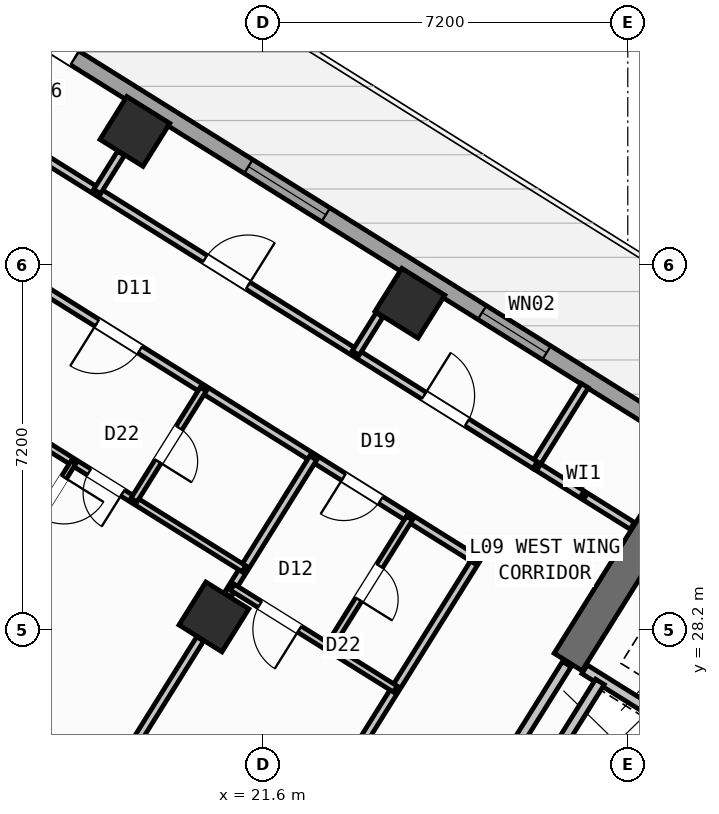
"""IFC4 building model, lengths in metres.
Left out: names, types, materials, properties, quantities, classifications, styles, units other than length and angle.
Written with IfcOpenShell. Run it as: python <this file> out.ifc"""

import sys

from ifc_helpers import new_model, si_unit, direction, frame, frame_2d, origin, origin_2d, place, context, subcontext, project, spatial, rectangle, hollow_rectangle, extrude, source, transform, mapped, element, fill, save


model = new_model("IFC4")
c1 = context("Model", 3, precision=1e-05, world=origin(), true_north=direction((0.0, 1.0)))
c2 = subcontext(c1, "Body", "Model", "MODEL_VIEW")
j1 = project(units=[si_unit("LENGTHUNIT", "METRE"), si_unit("PLANEANGLEUNIT", "RADIAN")], contexts=[c1])
p1 = place(None, origin())
s1 = spatial("IfcSite", under=j1, at=p1, CompositionType="ELEMENT")
p2 = place(p1, origin())
s2 = spatial("IfcBuilding", under=s1, at=p2, CompositionType="ELEMENT")
p3 = place(p2, frame((0.0, 0.0, 38.4)))
s3 = spatial("IfcBuildingStorey", under=s2, at=p3, CompositionType="ELEMENT", Elevation=38.4)
p4 = place(p3, frame((29.491, 30.552, 0.0), z_axis=(0.0, 0.0, 1.0), x_axis=(-0.529893103397, -0.8480644427, 0.0)))
e1 = element("IfcWall", 1, at=p4, inside=s3, PredefinedType="SHEAR", context=c2, shape_type="SweptSolid", body=[
    extrude(rectangle(XDim=3.525, YDim=0.65, at=frame_2d((1.763, 0.0))), origin(), (0.0, 0.0, 1.0), 3.35),
])
m1 = source(origin(), c2, "Body", "SweptSolid", [
    extrude(hollow_rectangle(XDim=1.0, YDim=1.0, WallThickness=0.04, at=origin_2d()), origin(), (0.0, 0.0, 1.0), 3.6),
])
for number, where, z_axis, x_axis in (
    (2, (24.5, 34.643, 0.0), (0.0, 0.0, 1.0), (-0.848, 0.53, 0.0)),
    (3, (20.632, 28.452, 0.0), (0.0, 0.0, 1.0), (-0.848, 0.53, 0.0)),
    (4, (19.073, 38.034, 0.0), (0.0, 0.0, 1.0), (-0.848, 0.53, 0.0)),
):
    element("IfcColumn", number, at=place(p3, frame(where, z_axis=z_axis, x_axis=x_axis)), inside=s3, PredefinedType="COLUMN", context=c2, shape_type="MappedRepresentation", body=[
        mapped(m1, transform((0.0, 0.0, 0.0), scale=1.0)),
    ])
p5 = place(p3, frame((14.138, 41.825, 0.0), z_axis=(0.0, 0.0, 1.0), x_axis=(0.848046498049, -0.529921821731, 0.0)))
e5 = element("IfcWall", 5, at=p5, inside=s3, PredefinedType="STANDARD", context=c2, shape_type="SweptSolid", body=[
    extrude(rectangle(XDim=31.588, YDim=0.32, at=frame_2d((15.794, 0.0))), origin(), (0.0, 0.0, 1.0), 3.35),
])
p6 = place(p5, frame((3.369, 0.0, 0.0)))
e6 = element("IfcOpeningElement", 6, at=p6, cuts=e5, PredefinedType="OPENING", context=c2, shape_type="SweptSolid", body=[
    extrude(rectangle(XDim=1.05, YDim=2.15, at=frame_2d((0.525, 1.075))), frame((0.0, 0.17, 0.0), z_axis=(0.0, -1.0, 0.0), x_axis=(1.0, 0.0, 0.0)), (0.0, 0.0, 1.0), 0.34),
])
p7 = place(p5, frame((0.946, 0.0, 0.85)))
e7 = element("IfcOpeningElement", 7, at=p7, cuts=e5, PredefinedType="OPENING", context=c2, shape_type="SweptSolid", body=[
    extrude(rectangle(XDim=1.8, YDim=1.5, at=frame_2d((0.9, 0.75))), frame((0.0, 0.17, 0.0), z_axis=(0.0, -1.0, 0.0), x_axis=(1.0, 0.0, 0.0)), (0.0, 0.0, 1.0), 0.34),
])
p8 = place(p5, frame((8.46, 0.0, 0.85)))
e8 = element("IfcOpeningElement", 8, at=p8, cuts=e5, PredefinedType="OPENING", context=c2, shape_type="SweptSolid", body=[
    extrude(rectangle(XDim=1.8, YDim=1.5, at=frame_2d((0.9, 0.75))), frame((0.0, 0.17, 0.0), z_axis=(0.0, -1.0, 0.0), x_axis=(1.0, 0.0, 0.0)), (0.0, 0.0, 1.0), 0.34),
])
p9 = place(p5, frame((13.899, 0.0, 0.85)))
e9 = element("IfcOpeningElement", 9, at=p9, cuts=e5, PredefinedType="OPENING", context=c2, shape_type="SweptSolid", body=[
    extrude(rectangle(XDim=1.5, YDim=1.5, at=frame_2d((0.75, 0.75))), frame((0.0, 0.17, 0.0), z_axis=(0.0, -1.0, 0.0), x_axis=(1.0, 0.0, 0.0)), (0.0, 0.0, 1.0), 0.34),
])
p10 = place(p5, frame((22.019, 0.0, 0.95)))
e10 = element("IfcOpeningElement", 10, at=p10, cuts=e5, PredefinedType="OPENING", context=c2, shape_type="SweptSolid", body=[
    extrude(rectangle(XDim=1.2, YDim=1.4, at=frame_2d((0.6, 0.7))), frame((0.0, 0.17, 0.0), z_axis=(0.0, -1.0, 0.0), x_axis=(1.0, 0.0, 0.0)), (0.0, 0.0, 1.0), 0.34),
])
p11 = place(p5, frame((27.569, 0.0, 0.95)))
e11 = element("IfcOpeningElement", 11, at=p11, cuts=e5, PredefinedType="OPENING", context=c2, shape_type="SweptSolid", body=[
    extrude(rectangle(XDim=1.2, YDim=1.4, at=frame_2d((0.6, 0.7))), frame((0.0, 0.17, 0.0), z_axis=(0.0, -1.0, 0.0), x_axis=(1.0, 0.0, 0.0)), (0.0, 0.0, 1.0), 0.34),
])
p12 = place(p3, frame((31.822, 24.998, 0.0), z_axis=(0.0, 0.0, 1.0), x_axis=(-0.848058348634, 0.529902856485, 0.0)))
e12 = element("IfcWall", 12, at=p12, inside=s3, PredefinedType="STANDARD", context=c2, shape_type="SweptSolid", body=[
    extrude(rectangle(XDim=4.568, YDim=0.2, at=frame_2d((2.284, 0.0))), origin(), (0.0, 0.0, 1.0), 3.34),
])
p13 = place(p3, frame((28.25, 27.17, 0.0), z_axis=(0.0, 0.0, 1.0), x_axis=(-0.529905827651, -0.848056492117, 0.0)))
e13 = element("IfcWall", 13, at=p13, inside=s3, PredefinedType="STANDARD", context=c2, shape_type="SweptSolid", body=[
    extrude(rectangle(XDim=1.65, YDim=0.2, at=frame_2d((0.825, 0.0))), origin(), (0.0, 0.0, 1.0), 3.34),
])
p14 = place(p3, frame((29.801, 26.142, 0.0), z_axis=(0.0, 0.0, 1.0), x_axis=(-0.529998940003, -0.847998304005, 0.0)))
e14 = element("IfcWall", 14, at=p14, inside=s3, PredefinedType="STANDARD", context=c2, shape_type="SweptSolid", body=[
    extrude(rectangle(XDim=1.58, YDim=0.2, at=frame_2d((0.79, 0.0))), origin(), (0.0, 0.0, 1.0), 3.34),
])
p15 = place(p3, frame((27.596, 27.52, 0.0), z_axis=(0.0, 0.0, 1.0), x_axis=(-0.529865479138, -0.848081702443, 0.0)))
e15 = element("IfcWall", 15, at=p15, inside=s3, PredefinedType="STANDARD", context=c2, shape_type="SweptSolid", body=[
    extrude(rectangle(XDim=2.96, YDim=0.2, at=frame_2d((1.48, 0.0))), origin(), (0.0, 0.0, 1.0), 3.34),
])
p16 = place(p15, frame((1.76, 0.0, 0.0)))
e16 = element("IfcOpeningElement", 16, at=p16, cuts=e15, PredefinedType="OPENING", context=c2, shape_type="SweptSolid", body=[
    extrude(rectangle(XDim=0.86, YDim=2.05, at=frame_2d((0.43, 1.025))), frame((0.0, 0.11, 0.0), z_axis=(0.0, -1.0, 0.0), x_axis=(1.0, 0.0, 0.0)), (0.0, 0.0, 1.0), 0.22),
])
p17 = place(p3, frame((28.887, 30.251, 0.0), z_axis=(0.0, 0.0, 1.0), x_axis=(-0.848040823168, 0.52993090327, 0.0)))
e17 = element("IfcWall", 17, at=p17, inside=s3, PredefinedType="PARTITIONING", context=c2, shape_type="SweptSolid", body=[
    extrude(rectangle(XDim=2.258, YDim=0.16, at=frame_2d((1.129, 0.0))), origin(), (0.0, 0.0, 1.0), 3.34),
])
p18 = place(p3, frame((27.953, 33.016, 0.0), z_axis=(0.0, 0.0, 1.0), x_axis=(-0.529880305451, -0.848072439061, 0.0)))
e18 = element("IfcWall", 18, at=p18, inside=s3, PredefinedType="PARTITIONING", context=c2, shape_type="SweptSolid", body=[
    extrude(rectangle(XDim=1.85, YDim=0.16, at=frame_2d((0.925, 0.0))), origin(), (0.0, 0.0, 1.0), 3.34),
])
p19 = place(p3, frame((25.807, 29.582, 0.0), z_axis=(0.0, 0.0, 1.0), x_axis=(-0.529918119251, -0.84804881162, 0.0)))
e19 = element("IfcWall", 19, at=p19, inside=s3, PredefinedType="PARTITIONING", context=c2, shape_type="SweptSolid", body=[
    extrude(rectangle(XDim=17.65, YDim=0.16, at=frame_2d((8.825, 0.0))), origin(), (0.0, 0.0, 1.0), 3.34),
])
p20 = place(p3, frame((26.973, 31.447, 0.0), z_axis=(0.0, 0.0, 1.0), x_axis=(-0.848048310262, 0.529918921593, 0.0)))
e20 = element("IfcWall", 20, at=p20, inside=s3, PredefinedType="PARTITIONING", context=c2, shape_type="SweptSolid", body=[
    extrude(rectangle(XDim=16.73, YDim=0.16, at=frame_2d((8.365, 0.0))), origin(), (0.0, 0.0, 1.0), 3.34),
])
p21 = place(p20, frame((1.588, 0.0, 0.0)))
e21 = element("IfcOpeningElement", 21, at=p21, cuts=e20, PredefinedType="OPENING", context=c2, shape_type="SweptSolid", body=[
    extrude(rectangle(XDim=1.0, YDim=2.1, at=frame_2d((0.5, 1.05))), frame((0.0, 0.09, 0.0), z_axis=(0.0, -1.0, 0.0), x_axis=(1.0, 0.0, 0.0)), (0.0, 0.0, 1.0), 0.18),
])
p22 = place(p20, frame((6.685, 0.0, 0.0)))
e22 = element("IfcOpeningElement", 22, at=p22, cuts=e20, PredefinedType="OPENING", context=c2, shape_type="SweptSolid", body=[
    extrude(rectangle(XDim=1.0, YDim=2.1, at=frame_2d((0.5, 1.05))), frame((0.0, 0.09, 0.0), z_axis=(0.0, -1.0, 0.0), x_axis=(1.0, 0.0, 0.0)), (0.0, 0.0, 1.0), 0.18),
])
p23 = place(p20, frame((12.951, 0.0, 0.0)))
e23 = element("IfcOpeningElement", 23, at=p23, cuts=e20, PredefinedType="OPENING", context=c2, shape_type="SweptSolid", body=[
    extrude(rectangle(XDim=1.0, YDim=2.1, at=frame_2d((0.5, 1.05))), frame((0.0, 0.09, 0.0), z_axis=(0.0, -1.0, 0.0), x_axis=(1.0, 0.0, 0.0)), (0.0, 0.0, 1.0), 0.18),
])
p24 = place(p3, frame((25.807, 29.582, 0.0), z_axis=(0.0, 0.0, 1.0), x_axis=(-0.848052408131, 0.529912363569, 0.0)))
e24 = element("IfcWall", 24, at=p24, inside=s3, PredefinedType="PARTITIONING", context=c2, shape_type="SweptSolid", body=[
    extrude(rectangle(XDim=16.73, YDim=0.16, at=frame_2d((8.365, 0.0))), origin(), (0.0, 0.0, 1.0), 3.34),
])
p25 = place(p24, frame((2.22, 0.0, 0.0)))
e25 = element("IfcOpeningElement", 25, at=p25, cuts=e24, PredefinedType="OPENING", context=c2, shape_type="SweptSolid", body=[
    extrude(rectangle(XDim=0.86, YDim=2.05, at=frame_2d((0.43, 1.025))), frame((0.0, 0.09, 0.0), z_axis=(0.0, -1.0, 0.0), x_axis=(1.0, 0.0, 0.0)), (0.0, 0.0, 1.0), 0.18),
])
p26 = place(p24, frame((7.82, 0.0, 0.0)))
e26 = element("IfcOpeningElement", 26, at=p26, cuts=e24, PredefinedType="OPENING", context=c2, shape_type="SweptSolid", body=[
    extrude(rectangle(XDim=1.0, YDim=2.1, at=frame_2d((0.5, 1.05))), frame((0.0, 0.09, 0.0), z_axis=(0.0, -1.0, 0.0), x_axis=(1.0, 0.0, 0.0)), (0.0, 0.0, 1.0), 0.18),
])
p27 = place(p24, frame((12.95, 0.0, 0.0)))
e27 = element("IfcOpeningElement", 27, at=p27, cuts=e24, PredefinedType="OPENING", context=c2, shape_type="SweptSolid", body=[
    extrude(rectangle(XDim=1.0, YDim=2.1, at=frame_2d((0.5, 1.05))), frame((0.0, 0.09, 0.0), z_axis=(0.0, -1.0, 0.0), x_axis=(1.0, 0.0, 0.0)), (0.0, 0.0, 1.0), 0.18),
])
p28 = place(p3, frame((22.593, 31.59, 0.0), z_axis=(0.0, 0.0, 1.0), x_axis=(-0.529930102756, -0.848041323399, 0.0)))
e28 = element("IfcWall", 28, at=p28, inside=s3, PredefinedType="PARTITIONING", context=c2, shape_type="SweptSolid", body=[
    extrude(rectangle(XDim=3.188, YDim=0.16, at=frame_2d((1.594, 0.0))), origin(), (0.0, 0.0, 1.0), 2.725),
])
p29 = place(p3, frame((20.361, 28.018, 0.0), z_axis=(0.0, 0.0, 1.0), x_axis=(-0.529915015264, -0.848050751193, 0.0)))
e29 = element("IfcWall", 29, at=p29, inside=s3, PredefinedType="PARTITIONING", context=c2, shape_type="SweptSolid", body=[
    extrude(rectangle(XDim=6.276, YDim=0.16, at=frame_2d((3.138, 0.0))), origin(), (0.0, 0.0, 1.0), 2.725),
])
p30 = place(p3, frame((24.212, 27.029, 0.0), z_axis=(0.0, 0.0, 1.0), x_axis=(-0.84803087207, 0.529946827537, 0.0)))
e30 = element("IfcWall", 30, at=p30, inside=s3, PredefinedType="PLUMBINGWALL", context=c2, shape_type="SweptSolid", body=[
    extrude(rectangle(XDim=3.79, YDim=0.14, at=frame_2d((1.895, 0.0))), origin(), (0.0, 0.0, 1.0), 3.34),
])
p31 = place(p30, frame((2.23, 0.0, 0.0)))
e31 = element("IfcOpeningElement", 31, at=p31, cuts=e30, PredefinedType="OPENING", context=c2, shape_type="SweptSolid", body=[
    extrude(rectangle(XDim=0.92, YDim=2.08, at=frame_2d((0.46, 1.04))), frame((0.0, 0.08, 0.0), z_axis=(0.0, -1.0, 0.0), x_axis=(1.0, 0.0, 0.0)), (0.0, 0.0, 1.0), 0.16),
])
p32 = place(p3, frame((24.492, 30.403, 0.0), z_axis=(0.0, 0.0, 1.0), x_axis=(-0.529977067289, -0.848011974059, 0.0)))
e32 = element("IfcWall", 32, at=p32, inside=s3, PredefinedType="PLUMBINGWALL", context=c2, shape_type="SweptSolid", body=[
    extrude(rectangle(XDim=3.01, YDim=0.14, at=frame_2d((1.505, 0.0))), origin(), (0.0, 0.0, 1.0), 2.995),
])
p33 = place(p32, frame((1.115, 0.0, 0.0)))
e33 = element("IfcOpeningElement", 33, at=p33, cuts=e32, PredefinedType="OPENING", context=c2, shape_type="SweptSolid", body=[
    extrude(rectangle(XDim=0.78, YDim=2.05, at=frame_2d((0.39, 1.025))), frame((0.0, 0.08, 0.0), z_axis=(0.0, -1.0, 0.0), x_axis=(1.0, 0.0, 0.0)), (0.0, 0.0, 1.0), 0.16),
])
p34 = place(p3, frame((21.226, 29.402, 0.0), z_axis=(0.0, 0.0, 1.0), x_axis=(-0.848039019877, 0.529933789039, 0.0)))
e34 = element("IfcWall", 34, at=p34, inside=s3, PredefinedType="PLUMBINGWALL", context=c2, shape_type="SweptSolid", body=[
    extrude(rectangle(XDim=6.4, YDim=0.14, at=frame_2d((3.2, 0.0))), origin(), (0.0, 0.0, 1.0), 3.34),
])
p35 = place(p34, frame((2.824, 0.0, 0.0)))
e35 = element("IfcOpeningElement", 35, at=p35, cuts=e34, PredefinedType="OPENING", context=c2, shape_type="SweptSolid", body=[
    extrude(rectangle(XDim=0.78, YDim=2.05, at=frame_2d((0.39, 1.025))), frame((0.0, 0.08, 0.0), z_axis=(0.0, -1.0, 0.0), x_axis=(1.0, 0.0, 0.0)), (0.0, 0.0, 1.0), 0.16),
])
p36 = place(p3, frame((20.422, 32.947, 0.0), z_axis=(0.0, 0.0, 1.0), x_axis=(-0.529913878929, -0.848051461244, 0.0)))
e36 = element("IfcWall", 36, at=p36, inside=s3, PredefinedType="PLUMBINGWALL", context=c2, shape_type="SweptSolid", body=[
    extrude(rectangle(XDim=2.58, YDim=0.14, at=frame_2d((1.29, 0.0))), origin(), (0.0, 0.0, 1.0), 3.34),
])
p37 = place(p36, frame((0.9, 0.0, 0.0)))
e37 = element("IfcOpeningElement", 37, at=p37, cuts=e36, PredefinedType="OPENING", context=c2, shape_type="SweptSolid", body=[
    extrude(rectangle(XDim=0.78, YDim=2.05, at=frame_2d((0.39, 1.025))), frame((0.0, 0.08, 0.0), z_axis=(0.0, -1.0, 0.0), x_axis=(1.0, 0.0, 0.0)), (0.0, 0.0, 1.0), 0.16),
])
p38 = place(p3, frame((17.861, 31.505, 0.0), z_axis=(0.0, 0.0, 1.0), x_axis=(-0.529928839727, -0.848042112649, 0.0)))
e38 = element("IfcWall", 38, at=p38, inside=s3, PredefinedType="PARTITIONING", context=c2, shape_type="SweptSolid", body=[
    extrude(rectangle(XDim=15.34, YDim=0.11, at=frame_2d((7.67, 0.0))), origin(), (0.0, 0.0, 1.0), 3.34),
])
p39 = place(p38, frame((0.35, 0.0, 0.0)))
e39 = element("IfcOpeningElement", 39, at=p39, cuts=e38, PredefinedType="OPENING", context=c2, shape_type="SweptSolid", body=[
    extrude(rectangle(XDim=0.92, YDim=2.08, at=frame_2d((0.46, 1.04))), frame((0.0, 0.065, 0.0), z_axis=(0.0, -1.0, 0.0), x_axis=(1.0, 0.0, 0.0)), (0.0, 0.0, 1.0), 0.13),
])
p40 = place(p3, frame((23.901, 34.414, 0.0), z_axis=(0.0, 0.0, 1.0), x_axis=(-0.529776512202, -0.848137280821, 0.0)))
e40 = element("IfcWall", 40, at=p40, inside=s3, PredefinedType="PARTITIONING", context=c2, shape_type="SweptSolid", body=[
    extrude(rectangle(XDim=0.888, YDim=0.16, at=frame_2d((0.444, 0.0))), origin(), (0.0, 0.0, 1.0), 3.34),
])
p41 = place(p3, frame((18.799, 37.602, 0.0), z_axis=(0.0, 0.0, 1.0), x_axis=(-0.529974231203, -0.848013746505, 0.0)))
e41 = element("IfcWall", 41, at=p41, inside=s3, PredefinedType="PARTITIONING", context=c2, shape_type="SweptSolid", body=[
    extrude(rectangle(XDim=0.888, YDim=0.16, at=frame_2d((0.444, 0.0))), origin(), (0.0, 0.0, 1.0), 2.725),
])
m2 = source(origin(), c2, "Body", "SweptSolid", [
    extrude(rectangle(XDim=1.05, YDim=2.15, at=frame_2d((0.525, 1.075))), frame((0.0, 0.025, 0.0), z_axis=(0.0, -1.0, 0.0), x_axis=(1.0, 0.0, 0.0)), (0.0, 0.0, 1.0), 0.05),
])
p42 = place(p6, origin())
e42 = element("IfcDoor", 42, at=p42, inside=s3, OperationType="SINGLE_SWING_RIGHT", PredefinedType="DOOR", context=c2, shape_type="MappedRepresentation", body=[
    mapped(m2, transform((0.0, 0.0, 0.0), scale=1.0)),
])
fill(e6, e42)
m3 = source(origin(), c2, "Body", "SweptSolid", [
    extrude(rectangle(XDim=1.8, YDim=1.5, at=frame_2d((0.9, 0.75))), frame((0.0, 0.03, 0.0), z_axis=(0.0, -1.0, 0.0), x_axis=(1.0, 0.0, 0.0)), (0.0, 0.0, 1.0), 0.06),
])
p43 = place(p8, origin())
e43 = element("IfcWindow", 43, at=p43, inside=s3, PartitioningType="SINGLE_PANEL", PredefinedType="WINDOW", context=c2, shape_type="MappedRepresentation", body=[
    mapped(m3, transform((0.0, 0.0, 0.0), scale=1.0)),
])
fill(e8, e43)
m4 = source(origin(), c2, "Body", "SweptSolid", [
    extrude(rectangle(XDim=1.5, YDim=1.5, at=frame_2d((0.75, 0.75))), frame((0.0, 0.03, 0.0), z_axis=(0.0, -1.0, 0.0), x_axis=(1.0, 0.0, 0.0)), (0.0, 0.0, 1.0), 0.06),
])
p44 = place(p9, origin())
e44 = element("IfcWindow", 44, at=p44, inside=s3, PartitioningType="SINGLE_PANEL", PredefinedType="WINDOW", context=c2, shape_type="MappedRepresentation", body=[
    mapped(m4, transform((0.0, 0.0, 0.0), scale=1.0)),
])
fill(e9, e44)
m5 = source(origin(), c2, "Body", "SweptSolid", [
    extrude(rectangle(XDim=0.86, YDim=2.05, at=frame_2d((0.43, 1.025))), frame((0.0, 0.025, 0.0), z_axis=(0.0, -1.0, 0.0), x_axis=(1.0, 0.0, 0.0)), (0.0, 0.0, 1.0), 0.05),
])
p45 = place(p25, origin())
e45 = element("IfcDoor", 45, at=p45, inside=s3, OperationType="SINGLE_SWING_RIGHT", PredefinedType="DOOR", context=c2, shape_type="MappedRepresentation", body=[
    mapped(m5, transform((0.0, 0.0, 0.0), scale=1.0)),
])
fill(e25, e45)
m6 = source(origin(), c2, "Body", "SweptSolid", [
    extrude(rectangle(XDim=0.92, YDim=2.08, at=frame_2d((0.46, 1.04))), frame((0.0, 0.025, 0.0), z_axis=(0.0, -1.0, 0.0), x_axis=(1.0, 0.0, 0.0)), (0.0, 0.0, 1.0), 0.05),
])
p46 = place(p31, origin())
e46 = element("IfcDoor", 46, at=p46, inside=s3, OperationType="SINGLE_SWING_LEFT", PredefinedType="DOOR", context=c2, shape_type="MappedRepresentation", body=[
    mapped(m6, transform((0.0, 0.0, 0.0), scale=1.0)),
])
fill(e31, e46)
m7 = source(origin(), c2, "Body", "SweptSolid", [
    extrude(rectangle(XDim=0.78, YDim=2.05, at=frame_2d((0.39, 1.025))), frame((0.0, 0.025, 0.0), z_axis=(0.0, -1.0, 0.0), x_axis=(1.0, 0.0, 0.0)), (0.0, 0.0, 1.0), 0.05),
])
p47 = place(p33, origin())
e47 = element("IfcDoor", 47, at=p47, inside=s3, OperationType="SINGLE_SWING_RIGHT", PredefinedType="DOOR", context=c2, shape_type="MappedRepresentation", body=[
    mapped(m7, transform((0.0, 0.0, 0.0), scale=1.0)),
])
fill(e33, e47)
p48 = place(p39, origin())
e48 = element("IfcDoor", 48, at=p48, inside=s3, OperationType="SINGLE_SWING_LEFT", PredefinedType="DOOR", context=c2, shape_type="MappedRepresentation", body=[
    mapped(m6, transform((0.0, 0.0, 0.0), scale=1.0)),
])
fill(e39, e48)
m8 = source(origin(), c2, "Body", "SweptSolid", [
    extrude(rectangle(XDim=1.0, YDim=2.1, at=frame_2d((0.5, 1.05))), frame((0.0, 0.025, 0.0), z_axis=(0.0, -1.0, 0.0), x_axis=(1.0, 0.0, 0.0)), (0.0, 0.0, 1.0), 0.05),
])
p49 = place(p26, origin())
e49 = element("IfcDoor", 49, at=p49, inside=s3, OperationType="SINGLE_SWING_RIGHT", PredefinedType="DOOR", context=c2, shape_type="MappedRepresentation", body=[
    mapped(m8, transform((0.0, 0.0, 0.0), scale=1.0)),
])
fill(e26, e49)
p50 = place(p35, origin())
e50 = element("IfcDoor", 50, at=p50, inside=s3, OperationType="SINGLE_SWING_LEFT", PredefinedType="DOOR", context=c2, shape_type="MappedRepresentation", body=[
    mapped(m7, transform((0.0, 0.0, 0.0), scale=1.0)),
])
fill(e35, e50)
p51 = place(p37, origin())
e51 = element("IfcDoor", 51, at=p51, inside=s3, OperationType="SINGLE_SWING_RIGHT", PredefinedType="DOOR", context=c2, shape_type="MappedRepresentation", body=[
    mapped(m7, transform((0.0, 0.0, 0.0), scale=1.0)),
])
fill(e37, e51)
p52 = place(p21, frame((1.0, 0.0, 0.0), z_axis=(0.0, 0.0, 1.0), x_axis=(-1.0, 0.0, 0.0)))
e52 = element("IfcDoor", 52, at=p52, inside=s3, OperationType="SINGLE_SWING_LEFT", PredefinedType="DOOR", context=c2, shape_type="MappedRepresentation", body=[
    mapped(m8, transform((0.0, 0.0, 0.0), scale=1.0)),
])
fill(e21, e52)
p53 = place(p22, frame((1.0, 0.0, 0.0), z_axis=(0.0, 0.0, 1.0), x_axis=(-1.0, 0.0, 0.0)))
e53 = element("IfcDoor", 53, at=p53, inside=s3, OperationType="SINGLE_SWING_RIGHT", PredefinedType="DOOR", context=c2, shape_type="MappedRepresentation", body=[
    mapped(m8, transform((0.0, 0.0, 0.0), scale=1.0)),
])
fill(e22, e53)
save(model, sys.argv[1])
